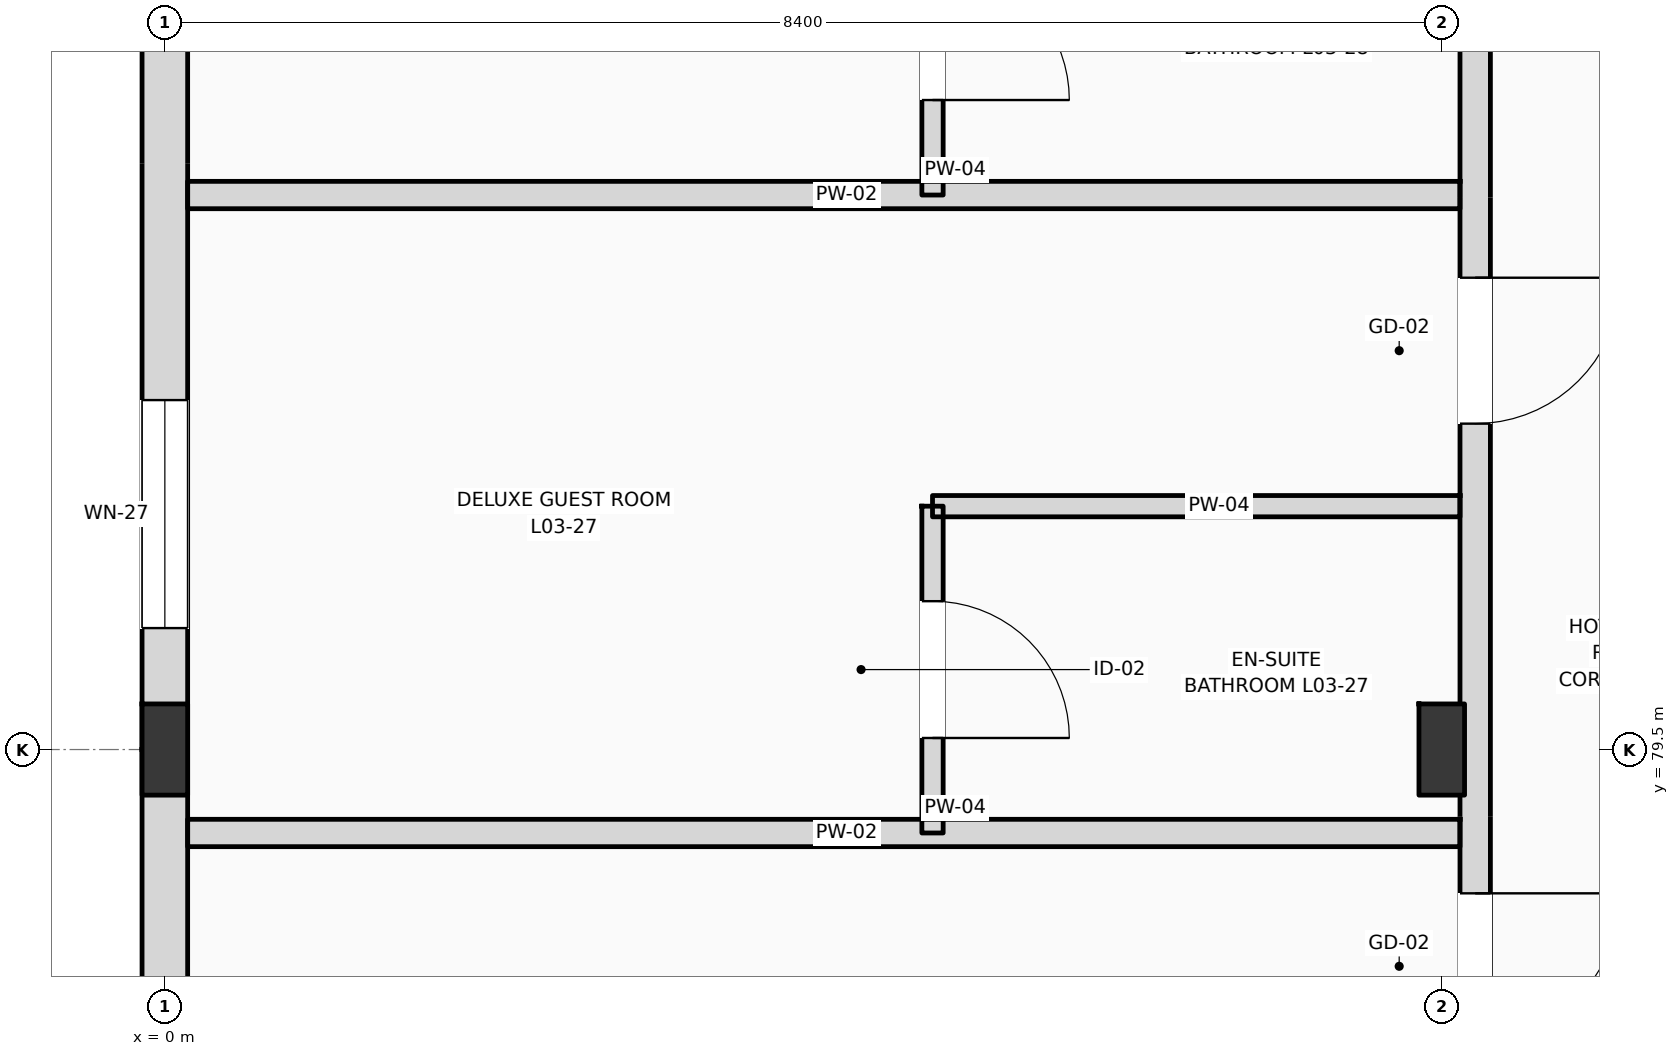
"""IFC4 building model, lengths in metres.
Left out: names, types, materials, properties, quantities, classifications, styles, units other than length and angle.
Written with IfcOpenShell. Run it as: python <this file> out.ifc"""

import sys

from ifc_helpers import new_model, si_unit, direction, frame, frame_2d, origin, origin_2d, place, context, subcontext, project, spatial, rectangle, i_section, extrude, element, fill, save


model = new_model("IFC4")
c1 = context("Model", 3, precision=1e-05, world=origin(), true_north=direction((0.0, 1.0)))
c2 = subcontext(c1, "Body", "Model", "MODEL_VIEW")
j1 = project(units=[si_unit("LENGTHUNIT", "METRE"), si_unit("PLANEANGLEUNIT", "RADIAN")], contexts=[c1])
p1 = place(None, origin())
s1 = spatial("IfcSite", under=j1, at=p1, CompositionType="ELEMENT")
p2 = place(p1, origin())
s2 = spatial("IfcBuilding", under=s1, at=p2, CompositionType="ELEMENT")
p3 = place(p2, frame((0.0, 0.0, 16.2)))
s3 = spatial("IfcBuildingStorey", under=s2, at=p3, CompositionType="ELEMENT", Elevation=16.2)
for number, where, z_axis, x_axis in (
    (1, (0.0, 79.5, 0.0), (0.0, 0.0, 1.0), (1.0, 0.0, 0.0)),
    (2, (8.4, 79.5, 0.0), (0.0, 0.0, 1.0), (1.0, 0.0, 0.0)),
):
    element("IfcColumn", number, at=place(p3, frame(where, z_axis=z_axis, x_axis=x_axis)), inside=s3, PredefinedType="COLUMN", context=c2, shape_type="SweptSolid", body=[
        extrude(i_section(OverallWidth=0.3, OverallDepth=0.6, WebThickness=0.015, FlangeThickness=0.03, FilletRadius=0.027, at=origin_2d()), origin(), (0.0, 0.0, 1.0), 4.2),
    ])
p4 = place(p3, frame((0.0, 71.0, 0.0), z_axis=(0.0, 0.0, 1.0), x_axis=(0.0, 1.0, 0.0)))
e3 = element("IfcWall", 3, at=p4, inside=s3, PredefinedType="STANDARD", context=c2, shape_type="SweptSolid", body=[
    extrude(rectangle(XDim=8.5, YDim=0.3, at=frame_2d((4.25, 0.0))), origin(), (0.0, 0.0, 1.0), 3.51),
])
p5 = place(p4, frame((1.2, 0.0, 0.9)))
e4 = element("IfcOpeningElement", 4, at=p5, cuts=e3, PredefinedType="OPENING", context=c2, shape_type="SweptSolid", body=[
    extrude(rectangle(XDim=1.5, YDim=2.3, at=frame_2d((0.75, 1.15))), frame((0.0, 0.16, 0.0), z_axis=(0.0, -1.0, 0.0), x_axis=(1.0, 0.0, 0.0)), (0.0, 0.0, 1.0), 0.32),
])
p6 = place(p4, frame((5.25, 0.0, 0.9)))
e5 = element("IfcOpeningElement", 5, at=p6, cuts=e3, PredefinedType="OPENING", context=c2, shape_type="SweptSolid", body=[
    extrude(rectangle(XDim=1.5, YDim=2.43, at=frame_2d((0.75, 1.215))), frame((0.0, 0.16, 0.0), z_axis=(0.0, -1.0, 0.0), x_axis=(1.0, 0.0, 0.0)), (0.0, 0.0, 1.0), 0.32),
])
p7 = place(p3, frame((0.0, 79.5, 0.0), z_axis=(0.0, 0.0, 1.0), x_axis=(0.0, 1.0, 0.0)))
e6 = element("IfcWall", 6, at=p7, inside=s3, PredefinedType="STANDARD", context=c2, shape_type="SweptSolid", body=[
    extrude(rectangle(XDim=8.5, YDim=0.3, at=frame_2d((4.25, 0.0))), origin(), (0.0, 0.0, 1.0), 3.51),
])
p8 = place(p7, frame((0.799, 0.0, 0.9)))
e7 = element("IfcOpeningElement", 7, at=p8, cuts=e6, PredefinedType="OPENING", context=c2, shape_type="SweptSolid", body=[
    extrude(rectangle(XDim=1.5, YDim=2.43, at=frame_2d((0.75, 1.215))), frame((0.0, 0.16, 0.0), z_axis=(0.0, -1.0, 0.0), x_axis=(1.0, 0.0, 0.0)), (0.0, 0.0, 1.0), 0.32),
])
p9 = place(p7, frame((4.85, 0.0, 0.9)))
e8 = element("IfcOpeningElement", 8, at=p9, cuts=e6, PredefinedType="OPENING", context=c2, shape_type="SweptSolid", body=[
    extrude(rectangle(XDim=1.5, YDim=2.43, at=frame_2d((0.75, 1.215))), frame((0.0, 0.16, 0.0), z_axis=(0.0, -1.0, 0.0), x_axis=(1.0, 0.0, 0.0)), (0.0, 0.0, 1.0), 0.32),
])
p10 = place(p3, frame((8.62, 62.64, 0.0), z_axis=(0.0, 0.0, 1.0), x_axis=(0.0, 1.0, 0.0)))
e9 = element("IfcWall", 9, at=p10, inside=s3, PredefinedType="PARTITIONING", context=c2, shape_type="SweptSolid", body=[
    extrude(rectangle(XDim=32.66, YDim=0.2, at=frame_2d((16.33, 0.0))), origin(), (0.0, 0.0, 1.0), 3.51),
])
p11 = place(p10, frame((2.829, 0.0, 0.0)))
e10 = element("IfcOpeningElement", 10, at=p11, cuts=e9, PredefinedType="OPENING", context=c2, shape_type="SweptSolid", body=[
    extrude(rectangle(XDim=0.96, YDim=2.2, at=frame_2d((0.48, 1.1))), frame((0.0, 0.11, 0.0), z_axis=(0.0, -1.0, 0.0), x_axis=(1.0, 0.0, 0.0)), (0.0, 0.0, 1.0), 0.22),
])
p12 = place(p10, frame((4.704, 0.0, 0.0)))
e11 = element("IfcOpeningElement", 11, at=p12, cuts=e9, PredefinedType="OPENING", context=c2, shape_type="SweptSolid", body=[
    extrude(rectangle(XDim=0.96, YDim=2.2, at=frame_2d((0.48, 1.1))), frame((0.0, 0.11, 0.0), z_axis=(0.0, -1.0, 0.0), x_axis=(1.0, 0.0, 0.0)), (0.0, 0.0, 1.0), 0.22),
])
p13 = place(p10, frame((10.905, 0.0, 0.0)))
e12 = element("IfcOpeningElement", 12, at=p13, cuts=e9, PredefinedType="OPENING", context=c2, shape_type="SweptSolid", body=[
    extrude(rectangle(XDim=0.96, YDim=2.2, at=frame_2d((0.48, 1.1))), frame((0.0, 0.11, 0.0), z_axis=(0.0, -1.0, 0.0), x_axis=(1.0, 0.0, 0.0)), (0.0, 0.0, 1.0), 0.22),
])
p14 = place(p10, frame((14.954, 0.0, 0.0)))
e13 = element("IfcOpeningElement", 13, at=p14, cuts=e9, PredefinedType="OPENING", context=c2, shape_type="SweptSolid", body=[
    extrude(rectangle(XDim=0.96, YDim=2.2, at=frame_2d((0.48, 1.1))), frame((0.0, 0.11, 0.0), z_axis=(0.0, -1.0, 0.0), x_axis=(1.0, 0.0, 0.0)), (0.0, 0.0, 1.0), 0.22),
])
p15 = place(p10, frame((19.004, 0.0, 0.0)))
e14 = element("IfcOpeningElement", 14, at=p15, cuts=e9, PredefinedType="OPENING", context=c2, shape_type="SweptSolid", body=[
    extrude(rectangle(XDim=0.96, YDim=2.2, at=frame_2d((0.48, 1.1))), frame((0.0, 0.11, 0.0), z_axis=(0.0, -1.0, 0.0), x_axis=(1.0, 0.0, 0.0)), (0.0, 0.0, 1.0), 0.22),
])
p16 = place(p10, frame((23.055, 0.0, 0.0)))
e15 = element("IfcOpeningElement", 15, at=p16, cuts=e9, PredefinedType="OPENING", context=c2, shape_type="SweptSolid", body=[
    extrude(rectangle(XDim=0.96, YDim=2.2, at=frame_2d((0.48, 1.1))), frame((0.0, 0.11, 0.0), z_axis=(0.0, -1.0, 0.0), x_axis=(1.0, 0.0, 0.0)), (0.0, 0.0, 1.0), 0.22),
])
p17 = place(p10, frame((27.104, 0.0, 0.0)))
e16 = element("IfcOpeningElement", 16, at=p17, cuts=e9, PredefinedType="OPENING", context=c2, shape_type="SweptSolid", body=[
    extrude(rectangle(XDim=0.96, YDim=2.2, at=frame_2d((0.48, 1.1))), frame((0.0, 0.11, 0.0), z_axis=(0.0, -1.0, 0.0), x_axis=(1.0, 0.0, 0.0)), (0.0, 0.0, 1.0), 0.22),
])
p18 = place(p10, frame((31.179, 0.0, 0.0)))
e17 = element("IfcOpeningElement", 17, at=p18, cuts=e9, PredefinedType="OPENING", context=c2, shape_type="SweptSolid", body=[
    extrude(rectangle(XDim=0.96, YDim=2.2, at=frame_2d((0.48, 1.1))), frame((0.0, 0.11, 0.0), z_axis=(0.0, -1.0, 0.0), x_axis=(1.0, 0.0, 0.0)), (0.0, 0.0, 1.0), 0.22),
])
for number, where, z_axis, x_axis in (
    (18, (0.15, 78.951, 0.0), (0.0, 0.0, 1.0), (1.0, 0.0, 0.0)),
    (19, (0.15, 83.148, 0.0), (0.0, 0.0, 1.0), (1.0, 0.0, 0.0)),
):
    element("IfcWall", number, at=place(p3, frame(where, z_axis=z_axis, x_axis=x_axis)), inside=s3, PredefinedType="PARTITIONING", context=c2, shape_type="SweptSolid", body=[
        extrude(rectangle(XDim=8.37, YDim=0.18, at=frame_2d((4.185, 0.0))), origin(), (0.0, 0.0, 1.0), 3.92),
    ])
p19 = place(p3, frame((5.05, 81.101, 0.0), z_axis=(0.0, 0.0, 1.0), x_axis=(1.0, 0.0, 0.0)))
e20 = element("IfcWall", 20, at=p19, inside=s3, PredefinedType="PARTITIONING", context=c2, shape_type="SweptSolid", body=[
    extrude(rectangle(XDim=3.47, YDim=0.14, at=frame_2d((1.735, 0.0))), origin(), (0.0, 0.0, 1.0), 3.92),
])
p20 = place(p3, frame((5.05, 78.951, 0.0), z_axis=(0.0, 0.0, 1.0), x_axis=(0.0, 1.0, 0.0)))
e21 = element("IfcWall", 21, at=p20, inside=s3, PredefinedType="PARTITIONING", context=c2, shape_type="SweptSolid", body=[
    extrude(rectangle(XDim=2.15, YDim=0.14, at=frame_2d((1.075, 0.0))), origin(), (0.0, 0.0, 1.0), 3.92),
])
p21 = place(p20, frame((0.625, 0.0, 0.0)))
e22 = element("IfcOpeningElement", 22, at=p21, cuts=e21, PredefinedType="OPENING", context=c2, shape_type="SweptSolid", body=[
    extrude(rectangle(XDim=0.9, YDim=2.1, at=frame_2d((0.45, 1.05))), frame((0.0, 0.08, 0.0), z_axis=(0.0, -1.0, 0.0), x_axis=(1.0, 0.0, 0.0)), (0.0, 0.0, 1.0), 0.16),
])
p22 = place(p3, frame((5.05, 83.148, 0.0), z_axis=(0.0, 0.0, 1.0), x_axis=(0.0, 1.0, 0.0)))
e23 = element("IfcWall", 23, at=p22, inside=s3, PredefinedType="PARTITIONING", context=c2, shape_type="SweptSolid", body=[
    extrude(rectangle(XDim=2.15, YDim=0.14, at=frame_2d((1.075, 0.0))), origin(), (0.0, 0.0, 1.0), 3.92),
])
p23 = place(p22, frame((0.625, 0.0, 0.0)))
e24 = element("IfcOpeningElement", 24, at=p23, cuts=e23, PredefinedType="OPENING", context=c2, shape_type="SweptSolid", body=[
    extrude(rectangle(XDim=0.9, YDim=2.1, at=frame_2d((0.45, 1.05))), frame((0.0, 0.08, 0.0), z_axis=(0.0, -1.0, 0.0), x_axis=(1.0, 0.0, 0.0)), (0.0, 0.0, 1.0), 0.16),
])
p24 = place(p8, origin())
e25 = element("IfcWindow", 25, at=p24, inside=s3, PartitioningType="DOUBLE_PANEL_VERTICAL", PredefinedType="WINDOW", context=c2, shape_type="SweptSolid", body=[
    extrude(rectangle(XDim=1.5, YDim=2.43, at=frame_2d((0.75, 1.215))), frame((0.0, 0.03, 0.0), z_axis=(0.0, -1.0, 0.0), x_axis=(1.0, 0.0, 0.0)), (0.0, 0.0, 1.0), 0.06),
])
fill(e7, e25)
p25 = place(p14, frame((0.96, 0.0, 0.0), z_axis=(0.0, 0.0, 1.0), x_axis=(-1.0, 0.0, 0.0)))
e26 = element("IfcDoor", 26, at=p25, inside=s3, OperationType="SINGLE_SWING_RIGHT", PredefinedType="DOOR", context=c2, shape_type="SweptSolid", body=[
    extrude(rectangle(XDim=0.96, YDim=2.2, at=frame_2d((0.48, 1.1))), frame((0.0, 0.025, 0.0), z_axis=(0.0, -1.0, 0.0), x_axis=(1.0, 0.0, 0.0)), (0.0, 0.0, 1.0), 0.05),
])
fill(e13, e26)
p26 = place(p15, frame((0.96, 0.0, 0.0), z_axis=(0.0, 0.0, 1.0), x_axis=(-1.0, 0.0, 0.0)))
e27 = element("IfcDoor", 27, at=p26, inside=s3, OperationType="SINGLE_SWING_RIGHT", PredefinedType="DOOR", context=c2, shape_type="SweptSolid", body=[
    extrude(rectangle(XDim=0.96, YDim=2.2, at=frame_2d((0.48, 1.1))), frame((0.0, 0.025, 0.0), z_axis=(0.0, -1.0, 0.0), x_axis=(1.0, 0.0, 0.0)), (0.0, 0.0, 1.0), 0.05),
])
fill(e14, e27)
p27 = place(p21, frame((0.9, 0.0, 0.0), z_axis=(0.0, 0.0, 1.0), x_axis=(-1.0, 0.0, 0.0)))
e28 = element("IfcDoor", 28, at=p27, inside=s3, OperationType="SINGLE_SWING_LEFT", PredefinedType="DOOR", context=c2, shape_type="SweptSolid", body=[
    extrude(rectangle(XDim=0.9, YDim=2.1, at=frame_2d((0.45, 1.05))), frame((0.0, 0.025, 0.0), z_axis=(0.0, -1.0, 0.0), x_axis=(1.0, 0.0, 0.0)), (0.0, 0.0, 1.0), 0.05),
])
fill(e22, e28)
p28 = place(p23, frame((0.9, 0.0, 0.0), z_axis=(0.0, 0.0, 1.0), x_axis=(-1.0, 0.0, 0.0)))
e29 = element("IfcDoor", 29, at=p28, inside=s3, OperationType="SINGLE_SWING_LEFT", PredefinedType="DOOR", context=c2, shape_type="SweptSolid", body=[
    extrude(rectangle(XDim=0.9, YDim=2.1, at=frame_2d((0.45, 1.05))), frame((0.0, 0.025, 0.0), z_axis=(0.0, -1.0, 0.0), x_axis=(1.0, 0.0, 0.0)), (0.0, 0.0, 1.0), 0.05),
])
fill(e24, e29)
save(model, sys.argv[1])
